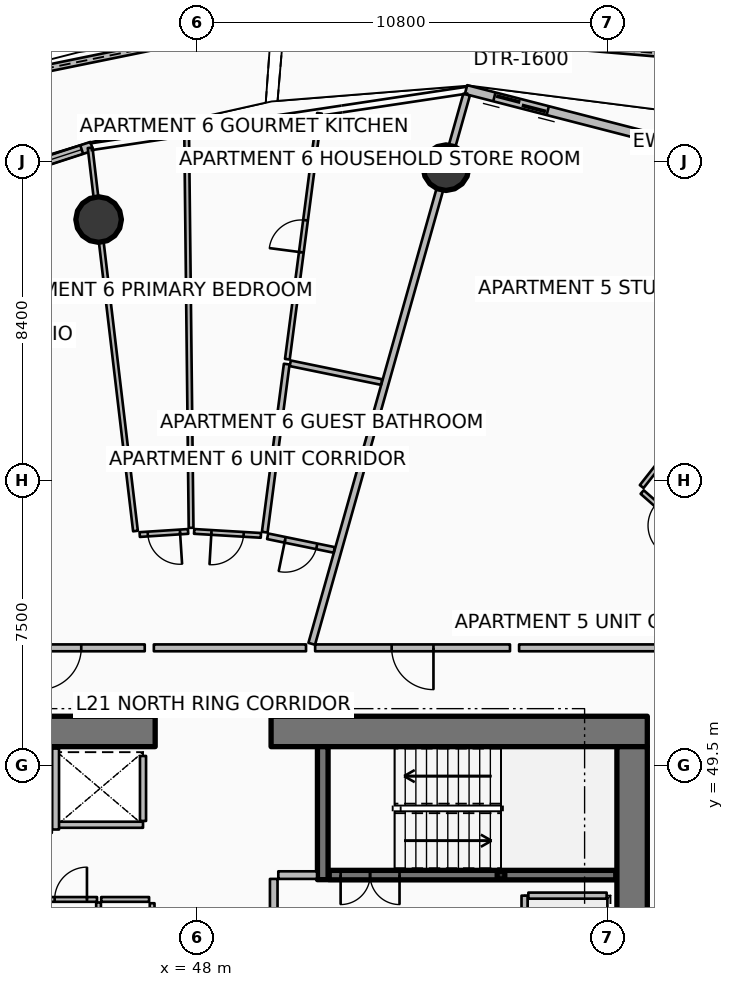
"""IFC4 building model, lengths in metres.
Left out: names, types, materials, properties, quantities, classifications, styles, units other than length and angle.
Written with IfcOpenShell. Run it as: python <this file> out.ifc"""

import sys

from ifc_helpers import new_model, si_unit, direction, frame, frame_2d, origin, origin_2d, place, context, subcontext, project, spatial, polyline, rectangle, hollow_rectangle, circle, outline, extrude, element, fill, save


model = new_model("IFC4")
c1 = context("Model", 3, precision=1e-05, world=origin(), true_north=direction((0.0, 1.0)))
c2 = subcontext(c1, "Body", "Model", "MODEL_VIEW")
j1 = project(units=[si_unit("LENGTHUNIT", "METRE"), si_unit("PLANEANGLEUNIT", "RADIAN")], contexts=[c1])
p1 = place(None, origin())
s1 = spatial("IfcSite", under=j1, at=p1, CompositionType="ELEMENT")
p2 = place(p1, origin())
s2 = spatial("IfcBuilding", under=s1, at=p2, CompositionType="ELEMENT")
p3 = place(p2, frame((0.0, 0.0, 86.4)))
s3 = spatial("IfcBuildingStorey", under=s2, at=p3, CompositionType="ELEMENT", Elevation=86.4)
p4 = place(p3, frame((37.0, 50.4, 0.0), z_axis=(0.0, 0.0, 1.0), x_axis=(1.0, 0.0, 0.0)))
e1 = element("IfcWall", 1, at=p4, inside=s3, PredefinedType="SHEAR", context=c2, shape_type="SweptSolid", body=[
    extrude(rectangle(XDim=9.9, YDim=0.8, at=frame_2d((4.95, 0.0))), origin(), (0.0, 0.0, 1.0), 3.75),
])
p5 = place(p3, frame((49.95, 50.4, 0.0), z_axis=(0.0, 0.0, 1.0), x_axis=(1.0, 0.0, 0.0)))
e2 = element("IfcWall", 2, at=p5, inside=s3, PredefinedType="SHEAR", context=c2, shape_type="SweptSolid", body=[
    extrude(rectangle(XDim=9.9, YDim=0.8, at=frame_2d((4.95, 0.0))), origin(), (0.0, 0.0, 1.0), 3.75),
])
p6 = place(p3, frame((59.45, 34.0, 0.0), z_axis=(0.0, 0.0, 1.0), x_axis=(0.0, 1.0, 0.0)))
e3 = element("IfcWall", 3, at=p6, inside=s3, PredefinedType="SHEAR", context=c2, shape_type="SweptSolid", body=[
    extrude(rectangle(XDim=16.0, YDim=0.8, at=frame_2d((8.0, 0.0))), origin(), (0.0, 0.0, 1.0), 3.75),
])
p7 = place(p3, frame((51.31, 46.5, 0.0), z_axis=(0.0, 0.0, 1.0), x_axis=(0.0, 1.0, 0.0)))
e4 = element("IfcWall", 4, at=p7, inside=s3, PredefinedType="SHEAR", context=c2, shape_type="SweptSolid", body=[
    extrude(rectangle(XDim=3.5, YDim=0.28, at=frame_2d((1.75, 0.0))), origin(), (0.0, 0.0, 1.0), 3.75),
])
p8 = place(p3, frame((56.0, 46.62, 0.0), z_axis=(0.0, 0.0, 1.0), x_axis=(1.0, 0.0, 0.0)))
e5 = element("IfcColumn", 5, at=p8, inside=s3, PredefinedType="COLUMN", context=c2, shape_type="SweptSolid", body=[
    extrude(hollow_rectangle(XDim=0.2, YDim=0.2, WallThickness=0.01, InnerFilletRadius=0.01, OuterFilletRadius=0.02, at=origin_2d()), origin(), (0.0, 0.0, 1.0), 1.67),
])
for number, where, z_axis, x_axis in (
    (6, (54.553, 65.234, 0.0), (0.0, 0.0, 1.0), (1.0, 0.0, 0.0)),
    (7, (45.412, 63.869, 0.0), (0.0, 0.0, 1.0), (1.0, 0.0, 0.0)),
):
    element("IfcColumn", number, at=place(p3, frame(where, z_axis=z_axis, x_axis=x_axis)), inside=s3, PredefinedType="COLUMN", context=c2, shape_type="SweptSolid", body=[
        extrude(circle(Radius=0.6, at=origin_2d()), origin(), (0.0, 0.0, 1.0), 3.5),
    ])
p9 = place(p3, frame((61.201, 68.154, 0.0), z_axis=(0.0, 0.0, 1.0), x_axis=(-0.996375069037, 0.08506892383, 0.0)))
e8 = element("IfcWall", 8, at=p9, inside=s3, PredefinedType="PARAPET", context=c2, shape_type="SweptSolid", body=[
    extrude(outline(polyline([(0.0, 0.0), (10.943, 0.0), (10.943, 1.483), (5.471, 1.284), (0.0, 1.148), (0.0, 0.0)])), frame((0.0, 0.09, 0.0), z_axis=(0.0, -1.0, 0.0), x_axis=(1.0, 0.0, 0.0)), (0.0, 0.0, 1.0), 0.18),
])
p10 = place(p3, frame((49.963, 69.055, 0.0), z_axis=(0.0, 0.0, 1.0), x_axis=(-0.979793885894, -0.200009852668, 0.0)))
e9 = element("IfcWall", 9, at=p10, inside=s3, PredefinedType="PARAPET", context=c2, shape_type="SweptSolid", body=[
    extrude(outline(polyline([(0.0, 0.0), (10.173, 0.0), (10.173, 1.832), (5.086, 1.696), (0.0, 1.497), (0.0, 0.0)])), frame((0.0, 0.09, 0.0), z_axis=(0.0, -1.0, 0.0), x_axis=(1.0, 0.0, 0.0)), (0.0, 0.0, 1.0), 0.18),
])
p11 = place(p3, frame((65.814, 64.523, 0.0), z_axis=(0.0, 0.0, 1.0), x_axis=(-0.968356180858, 0.249572248045, 0.0)))
e10 = element("IfcWall", 10, at=p11, inside=s3, PredefinedType="SOLIDWALL", context=c2, shape_type="SweptSolid", body=[
    extrude(rectangle(XDim=11.084, YDim=0.24, at=frame_2d((5.542, 0.0))), origin(), (0.0, 0.0, 1.0), 2.45),
])
p12 = place(p11, frame((8.865, 0.0, 0.0)))
e11 = element("IfcOpeningElement", 11, at=p12, cuts=e10, PredefinedType="OPENING", context=c2, shape_type="SweptSolid", body=[
    extrude(rectangle(XDim=1.45, YDim=2.15, at=frame_2d((0.725, 1.075))), frame((0.0, 0.13, 0.0), z_axis=(0.0, -1.0, 0.0), x_axis=(1.0, 0.0, 0.0)), (0.0, 0.0, 1.0), 0.26),
])
p13 = place(p11, frame((0.28, 0.0, 0.65)))
e12 = element("IfcOpeningElement", 12, at=p13, cuts=e10, PredefinedType="OPENING", context=c2, shape_type="SweptSolid", body=[
    extrude(rectangle(XDim=1.6, YDim=1.5, at=frame_2d((0.8, 0.75))), frame((0.0, 0.13, 0.0), z_axis=(0.0, -1.0, 0.0), x_axis=(1.0, 0.0, 0.0)), (0.0, 0.0, 1.0), 0.26),
])
p14 = place(p3, frame((45.233, 65.797, 0.0), z_axis=(0.0, 0.0, 1.0), x_axis=(-0.951052494852, -0.30902937083, 0.0)))
e13 = element("IfcWall", 13, at=p14, inside=s3, PredefinedType="SOLIDWALL", context=c2, shape_type="SweptSolid", body=[
    extrude(rectangle(XDim=9.444, YDim=0.24, at=frame_2d((4.722, 0.0))), origin(), (0.0, 0.0, 1.0), 2.45),
])
p15 = place(p14, frame((7.224, 0.0, 0.0)))
e14 = element("IfcOpeningElement", 14, at=p15, cuts=e13, PredefinedType="OPENING", context=c2, shape_type="SweptSolid", body=[
    extrude(rectangle(XDim=1.45, YDim=2.15, at=frame_2d((0.725, 1.075))), frame((0.0, 0.13, 0.0), z_axis=(0.0, -1.0, 0.0), x_axis=(1.0, 0.0, 0.0)), (0.0, 0.0, 1.0), 0.26),
])
p16 = place(p14, frame((0.28, 0.0, 0.65)))
e15 = element("IfcOpeningElement", 15, at=p16, cuts=e13, PredefinedType="OPENING", context=c2, shape_type="SweptSolid", body=[
    extrude(rectangle(XDim=1.6, YDim=1.5, at=frame_2d((0.8, 0.75))), frame((0.0, 0.13, 0.0), z_axis=(0.0, -1.0, 0.0), x_axis=(1.0, 0.0, 0.0)), (0.0, 0.0, 1.0), 0.26),
])
p17 = place(p3, frame((51.48, 46.62, 0.0), z_axis=(0.0, 0.0, 1.0), x_axis=(1.0, 0.0, 0.0)))
e16 = element("IfcWall", 16, at=p17, inside=s3, PredefinedType="SOLIDWALL", context=c2, shape_type="SweptSolid", body=[
    extrude(rectangle(XDim=7.54, YDim=0.25, at=frame_2d((3.77, 0.0))), origin(), (0.0, 0.0, 1.0), 3.5),
])
p18 = place(p17, frame((0.3, 0.0, 0.0)))
e17 = element("IfcOpeningElement", 17, at=p18, cuts=e16, PredefinedType="OPENING", context=c2, shape_type="SweptSolid", body=[
    extrude(rectangle(XDim=1.55, YDim=2.15, at=frame_2d((0.775, 1.075))), frame((0.0, 0.135, 0.0), z_axis=(0.0, -1.0, 0.0), x_axis=(1.0, 0.0, 0.0)), (0.0, 0.0, 1.0), 0.27),
])
p19 = place(p3, frame((46.58, 47.945, 0.0), z_axis=(0.0, 0.0, 1.0), x_axis=(-1.0, 0.0, 0.0)))
e18 = element("IfcWall", 18, at=p19, inside=s3, PredefinedType="PARTITIONING", context=c2, shape_type="SweptSolid", body=[
    extrude(rectangle(XDim=2.26, YDim=0.16, at=frame_2d((1.13, 0.0))), origin(), (0.0, 0.0, 1.0), 3.5),
])
p20 = place(p3, frame((46.58, 48.045, 0.0), z_axis=(0.0, 0.0, 1.0), x_axis=(0.0, 1.0, 0.0)))
e19 = element("IfcWall", 19, at=p20, inside=s3, PredefinedType="PARTITIONING", context=c2, shape_type="SweptSolid", body=[
    extrude(rectangle(XDim=1.71, YDim=0.16, at=frame_2d((0.855, 0.0))), origin(), (0.0, 0.0, 1.0), 3.5),
])
p21 = place(p3, frame((56.62, 46.08, 0.0), z_axis=(0.0, 0.0, 1.0), x_axis=(0.0, -1.0, 0.0)))
e20 = element("IfcWall", 20, at=p21, inside=s3, PredefinedType="PARTITIONING", context=c2, shape_type="SweptSolid", body=[
    extrude(rectangle(XDim=2.46, YDim=0.16, at=frame_2d((1.23, 0.0))), origin(), (0.0, 0.0, 1.0), 3.5),
])
p22 = place(p21, frame((0.68, 0.0, 0.0)))
e21 = element("IfcOpeningElement", 21, at=p22, cuts=e20, PredefinedType="OPENING", context=c2, shape_type="SweptSolid", body=[
    extrude(rectangle(XDim=1.1, YDim=2.1, at=frame_2d((0.55, 1.05))), frame((0.0, 0.09, 0.0), z_axis=(0.0, -1.0, 0.0), x_axis=(1.0, 0.0, 0.0)), (0.0, 0.0, 1.0), 0.18),
])
p23 = place(p3, frame((56.72, 46.08, 0.0), z_axis=(0.0, 0.0, 1.0), x_axis=(1.0, 0.0, 0.0)))
e22 = element("IfcWall", 22, at=p23, inside=s3, PredefinedType="PARTITIONING", context=c2, shape_type="SweptSolid", body=[
    extrude(rectangle(XDim=2.06, YDim=0.16, at=frame_2d((1.03, 0.0))), origin(), (0.0, 0.0, 1.0), 3.5),
])
p24 = place(p3, frame((44.28, 47.82, 0.0), z_axis=(0.0, 0.0, 1.0), x_axis=(0.0, 1.0, 0.0)))
e23 = element("IfcWall", 23, at=p24, inside=s3, PredefinedType="PARTITIONING", context=c2, shape_type="SweptSolid", body=[
    extrude(rectangle(XDim=2.13, YDim=0.18, at=frame_2d((1.065, 0.0))), origin(), (0.0, 0.0, 1.0), 3.5),
])
p25 = place(p3, frame((50.14, 46.62, 0.0), z_axis=(0.0, 0.0, 1.0), x_axis=(1.0, 0.0, 0.0)))
e24 = element("IfcWall", 24, at=p25, inside=s3, PredefinedType="PARTITIONING", context=c2, shape_type="SweptSolid", body=[
    extrude(rectangle(XDim=1.02, YDim=0.2, at=frame_2d((0.51, 0.0))), origin(), (0.0, 0.0, 1.0), 3.5),
])
p26 = place(p3, frame((50.02, 43.22, 0.0), z_axis=(0.0, 0.0, 1.0), x_axis=(0.0, 1.0, 0.0)))
e25 = element("IfcWall", 25, at=p26, inside=s3, PredefinedType="PARTITIONING", context=c2, shape_type="SweptSolid", body=[
    extrude(rectangle(XDim=3.3, YDim=0.2, at=frame_2d((1.65, 0.0))), origin(), (0.0, 0.0, 1.0), 3.5),
])
p27 = place(p26, frame((1.125, 0.0, 0.0)))
e26 = element("IfcOpeningElement", 26, at=p27, cuts=e25, PredefinedType="OPENING", context=c2, shape_type="SweptSolid", body=[
    extrude(rectangle(XDim=1.05, YDim=2.1, at=frame_2d((0.525, 1.05))), frame((0.0, 0.11, 0.0), z_axis=(0.0, -1.0, 0.0), x_axis=(1.0, 0.0, 0.0)), (0.0, 0.0, 1.0), 0.22),
])
p28 = place(p3, frame((45.41, 43.67, 0.0), z_axis=(0.0, 0.0, 1.0), x_axis=(0.0, 1.0, 0.0)))
e27 = element("IfcWall", 27, at=p28, inside=s3, PredefinedType="PARTITIONING", context=c2, shape_type="SweptSolid", body=[
    extrude(rectangle(XDim=2.23, YDim=0.125, at=frame_2d((1.115, 0.0))), origin(), (0.0, 0.0, 1.0), 2.94),
])
p29 = place(p3, frame((46.82, 43.69, 0.0), z_axis=(0.0, 0.0, 1.0), x_axis=(0.0, 1.0, 0.0)))
e28 = element("IfcWall", 28, at=p29, inside=s3, PredefinedType="PARTITIONING", context=c2, shape_type="SweptSolid", body=[
    extrude(rectangle(XDim=2.19, YDim=0.125, at=frame_2d((1.095, 0.0))), origin(), (0.0, 0.0, 1.0), 2.94),
])
p30 = place(p29, frame((0.67, 0.0, 0.0)))
e29 = element("IfcOpeningElement", 29, at=p30, cuts=e28, PredefinedType="OPENING", context=c2, shape_type="SweptSolid", body=[
    extrude(rectangle(XDim=0.85, YDim=2.06, at=frame_2d((0.425, 1.03))), frame((0.0, 0.073, 0.0), z_axis=(0.0, -1.0, 0.0), x_axis=(1.0, 0.0, 0.0)), (0.0, 0.0, 1.0), 0.145),
])
p31 = place(p3, frame((43.99, 45.98, 0.0), z_axis=(0.0, 0.0, 1.0), x_axis=(1.0, 0.0, 0.0)))
e30 = element("IfcWall", 30, at=p31, inside=s3, PredefinedType="PARTITIONING", context=c2, shape_type="SweptSolid", body=[
    extrude(rectangle(XDim=1.38, YDim=0.125, at=frame_2d((0.69, 0.0))), origin(), (0.0, 0.0, 1.0), 2.94),
])
p32 = place(p31, frame((0.265, 0.0, 0.0)))
e31 = element("IfcOpeningElement", 31, at=p32, cuts=e30, PredefinedType="OPENING", context=c2, shape_type="SweptSolid", body=[
    extrude(rectangle(XDim=0.85, YDim=2.06, at=frame_2d((0.425, 1.03))), frame((0.0, 0.073, 0.0), z_axis=(0.0, -1.0, 0.0), x_axis=(1.0, 0.0, 0.0)), (0.0, 0.0, 1.0), 0.145),
])
p33 = place(p3, frame((45.48, 45.98, 0.0), z_axis=(0.0, 0.0, 1.0), x_axis=(1.0, 0.0, 0.0)))
e32 = element("IfcWall", 32, at=p33, inside=s3, PredefinedType="PARTITIONING", context=c2, shape_type="SweptSolid", body=[
    extrude(rectangle(XDim=1.26, YDim=0.125, at=frame_2d((0.63, 0.0))), origin(), (0.0, 0.0, 1.0), 2.94),
])
p34 = place(p3, frame((51.019, 52.706, 0.0), z_axis=(0.0, 0.0, 1.0), x_axis=(0.271450895995, 0.962452290279, 0.0)))
e33 = element("IfcWall", 33, at=p34, inside=s3, PredefinedType="PARTITIONING", context=c2, shape_type="SweptSolid", body=[
    extrude(rectangle(XDim=15.014, YDim=0.18, at=frame_2d((7.507, 0.0))), origin(), (0.0, 0.0, 1.0), 2.94),
])
p35 = place(p3, frame((56.236, 52.6, 0.0), z_axis=(0.0, 0.0, 1.0), x_axis=(-1.0, 0.0, 0.0)))
e34 = element("IfcWall", 34, at=p35, inside=s3, PredefinedType="PARTITIONING", context=c2, shape_type="SweptSolid", body=[
    extrude(rectangle(XDim=5.127, YDim=0.18, at=frame_2d((2.563, 0.0))), origin(), (0.0, 0.0, 1.0), 2.94),
])
p36 = place(p35, frame((2.013, 0.0, 0.0)))
e35 = element("IfcOpeningElement", 35, at=p36, cuts=e34, PredefinedType="OPENING", context=c2, shape_type="SweptSolid", body=[
    extrude(rectangle(XDim=1.1, YDim=2.1, at=frame_2d((0.55, 1.05))), frame((0.0, 0.1, 0.0), z_axis=(0.0, -1.0, 0.0), x_axis=(1.0, 0.0, 0.0)), (0.0, 0.0, 1.0), 0.2),
])
p37 = place(p3, frame((61.53, 52.6, 0.0), z_axis=(0.0, 0.0, 1.0), x_axis=(-1.0, 0.0, 0.0)))
e36 = element("IfcWall", 36, at=p37, inside=s3, PredefinedType="PARTITIONING", context=c2, shape_type="SweptSolid", body=[
    extrude(rectangle(XDim=5.054, YDim=0.18, at=frame_2d((2.527, 0.0))), origin(), (0.0, 0.0, 1.0), 2.94),
])
p38 = place(p3, frame((59.702, 56.844, 0.0), z_axis=(0.0, 0.0, 1.0), x_axis=(0.619083405129, 0.785325243128, 0.0)))
e37 = element("IfcWall", 37, at=p38, inside=s3, PredefinedType="PARTITIONING", context=c2, shape_type="SweptSolid", body=[
    extrude(rectangle(XDim=9.769, YDim=0.125, at=frame_2d((4.885, 0.0))), origin(), (0.0, 0.0, 1.0), 2.94),
])
p39 = place(p3, frame((61.084, 55.497, 0.0), z_axis=(0.0, 0.0, 1.0), x_axis=(-0.75124742024, 0.660020691784, 0.0)))
e38 = element("IfcWall", 38, at=p39, inside=s3, PredefinedType="PARTITIONING", context=c2, shape_type="SweptSolid", body=[
    extrude(rectangle(XDim=1.823, YDim=0.125, at=frame_2d((0.911, 0.0))), origin(), (0.0, 0.0, 1.0), 2.94),
])
p40 = place(p39, frame((0.486, 0.0, 0.0)))
e39 = element("IfcOpeningElement", 39, at=p40, cuts=e38, PredefinedType="OPENING", context=c2, shape_type="SweptSolid", body=[
    extrude(rectangle(XDim=0.85, YDim=2.06, at=frame_2d((0.425, 1.03))), frame((0.0, 0.073, 0.0), z_axis=(0.0, -1.0, 0.0), x_axis=(1.0, 0.0, 0.0)), (0.0, 0.0, 1.0), 0.145),
])
p41 = place(p3, frame((46.625, 52.6, 0.0), z_axis=(0.0, 0.0, 1.0), x_axis=(-1.0, 0.0, 0.0)))
e40 = element("IfcWall", 40, at=p41, inside=s3, PredefinedType="PARTITIONING", context=c2, shape_type="SweptSolid", body=[
    extrude(rectangle(XDim=4.442, YDim=0.18, at=frame_2d((2.221, 0.0))), origin(), (0.0, 0.0, 1.0), 2.94),
])
p42 = place(p41, frame((1.671, 0.0, 0.0)))
e41 = element("IfcOpeningElement", 41, at=p42, cuts=e40, PredefinedType="OPENING", context=c2, shape_type="SweptSolid", body=[
    extrude(rectangle(XDim=1.1, YDim=2.1, at=frame_2d((0.55, 1.05))), frame((0.0, 0.1, 0.0), z_axis=(0.0, -1.0, 0.0), x_axis=(1.0, 0.0, 0.0)), (0.0, 0.0, 1.0), 0.2),
])
p43 = place(p3, frame((50.869, 52.6, 0.0), z_axis=(0.0, 0.0, 1.0), x_axis=(-1.0, 0.0, 0.0)))
e42 = element("IfcWall", 42, at=p43, inside=s3, PredefinedType="PARTITIONING", context=c2, shape_type="SweptSolid", body=[
    extrude(rectangle(XDim=4.004, YDim=0.18, at=frame_2d((2.002, 0.0))), origin(), (0.0, 0.0, 1.0), 2.94),
])
p44 = place(p3, frame((46.382, 55.674, 0.0), z_axis=(0.0, 0.0, 1.0), x_axis=(-0.117533197276, 0.99306895407, 0.0)))
e43 = element("IfcWall", 43, at=p44, inside=s3, PredefinedType="PARTITIONING", context=c2, shape_type="SweptSolid", body=[
    extrude(rectangle(XDim=10.153, YDim=0.125, at=frame_2d((5.077, 0.0))), origin(), (0.0, 0.0, 1.0), 2.94),
])
p45 = place(p3, frame((51.612, 55.176, 0.0), z_axis=(0.0, 0.0, 1.0), x_axis=(-0.979559973395, 0.201152326663, 0.0)))
e44 = element("IfcWall", 44, at=p45, inside=s3, PredefinedType="PARTITIONING", context=c2, shape_type="SweptSolid", body=[
    extrude(rectangle(XDim=1.789, YDim=0.15, at=frame_2d((0.895, 0.0))), origin(), (0.0, 0.0, 1.0), 2.94),
])
p46 = place(p45, frame((0.469, 0.0, 0.0)))
e45 = element("IfcOpeningElement", 45, at=p46, cuts=e44, PredefinedType="OPENING", context=c2, shape_type="SweptSolid", body=[
    extrude(rectangle(XDim=0.85, YDim=2.06, at=frame_2d((0.425, 1.03))), frame((0.0, 0.085, 0.0), z_axis=(0.0, -1.0, 0.0), x_axis=(1.0, 0.0, 0.0)), (0.0, 0.0, 1.0), 0.17),
])
p47 = place(p3, frame((52.858, 59.594, 0.0), z_axis=(0.0, 0.0, 1.0), x_axis=(-0.979569035828, 0.201108189903, 0.0)))
e46 = element("IfcWall", 46, at=p47, inside=s3, PredefinedType="PARTITIONING", context=c2, shape_type="SweptSolid", body=[
    extrude(rectangle(XDim=2.453, YDim=0.15, at=frame_2d((1.227, 0.0))), origin(), (0.0, 0.0, 1.0), 2.94),
])
p48 = place(p3, frame((49.783, 55.643, 0.0), z_axis=(0.0, 0.0, 1.0), x_axis=(0.129624682181, 0.991563130501, 0.0)))
e47 = element("IfcWall", 47, at=p48, inside=s3, PredefinedType="PARTITIONING", context=c2, shape_type="SweptSolid", body=[
    extrude(rectangle(XDim=4.46, YDim=0.15, at=frame_2d((2.23, 0.0))), origin(), (0.0, 0.0, 1.0), 2.94),
])
p49 = place(p3, frame((50.378, 60.194, 0.0), z_axis=(0.0, 0.0, 1.0), x_axis=(0.129622249643, 0.991563448498, 0.0)))
e48 = element("IfcWall", 48, at=p49, inside=s3, PredefinedType="PARTITIONING", context=c2, shape_type="SweptSolid", body=[
    extrude(rectangle(XDim=6.526, YDim=0.125, at=frame_2d((3.263, 0.0))), origin(), (0.0, 0.0, 1.0), 2.94),
])
p50 = place(p49, frame((2.838, 0.0, 0.0)))
e49 = element("IfcOpeningElement", 49, at=p50, cuts=e48, PredefinedType="OPENING", context=c2, shape_type="SweptSolid", body=[
    extrude(rectangle(XDim=0.85, YDim=2.06, at=frame_2d((0.425, 1.03))), frame((0.0, 0.073, 0.0), z_axis=(0.0, -1.0, 0.0), x_axis=(1.0, 0.0, 0.0)), (0.0, 0.0, 1.0), 0.145),
])
p51 = place(p3, frame((47.845, 55.758, 0.0), z_axis=(0.0, 0.0, 1.0), x_axis=(-0.011264572172, 0.999936552694, 0.0)))
e50 = element("IfcWall", 50, at=p51, inside=s3, PredefinedType="PARTITIONING", context=c2, shape_type="SweptSolid", body=[
    extrude(rectangle(XDim=10.382, YDim=0.125, at=frame_2d((5.191, 0.0))), origin(), (0.0, 0.0, 1.0), 2.94),
])
p52 = place(p3, frame((49.682, 55.559, 0.0), z_axis=(0.0, 0.0, 1.0), x_axis=(-0.99824215698, 0.059267158097, 0.0)))
e51 = element("IfcWall", 51, at=p52, inside=s3, PredefinedType="PARTITIONING", context=c2, shape_type="SweptSolid", body=[
    extrude(rectangle(XDim=1.759, YDim=0.125, at=frame_2d((0.879, 0.0))), origin(), (0.0, 0.0, 1.0), 2.94),
])
p53 = place(p52, frame((0.455, 0.0, 0.0)))
e52 = element("IfcOpeningElement", 52, at=p53, cuts=e51, PredefinedType="OPENING", context=c2, shape_type="SweptSolid", body=[
    extrude(rectangle(XDim=0.85, YDim=2.06, at=frame_2d((0.425, 1.03))), frame((0.0, 0.073, 0.0), z_axis=(0.0, -1.0, 0.0), x_axis=(1.0, 0.0, 0.0)), (0.0, 0.0, 1.0), 0.145),
])
p54 = place(p3, frame((47.766, 55.663, 0.0), z_axis=(0.0, 0.0, 1.0), x_axis=(-0.997930857608, -0.064296216329, 0.0)))
e53 = element("IfcWall", 53, at=p54, inside=s3, PredefinedType="PARTITIONING", context=c2, shape_type="SweptSolid", body=[
    extrude(rectangle(XDim=1.276, YDim=0.125, at=frame_2d((0.638, 0.0))), origin(), (0.0, 0.0, 1.0), 2.94),
])
p55 = place(p54, frame((0.213, 0.0, 0.0)))
e54 = element("IfcOpeningElement", 54, at=p55, cuts=e53, PredefinedType="OPENING", context=c2, shape_type="SweptSolid", body=[
    extrude(rectangle(XDim=0.85, YDim=2.06, at=frame_2d((0.425, 1.03))), frame((0.0, 0.073, 0.0), z_axis=(0.0, -1.0, 0.0), x_axis=(1.0, 0.0, 0.0)), (0.0, 0.0, 1.0), 0.145),
])
p56 = place(p12, origin())
e55 = element("IfcDoor", 55, at=p56, inside=s3, OperationType="DOUBLE_DOOR_SLIDING", PredefinedType="DOOR", context=c2, shape_type="SweptSolid", body=[
    extrude(rectangle(XDim=1.45, YDim=2.15, at=frame_2d((0.725, 1.075))), frame((0.0, 0.025, 0.0), z_axis=(0.0, -1.0, 0.0), x_axis=(1.0, 0.0, 0.0)), (0.0, 0.0, 1.0), 0.05),
])
fill(e11, e55)
p57 = place(p16, origin())
e56 = element("IfcWindow", 56, at=p57, inside=s3, PartitioningType="SINGLE_PANEL", PredefinedType="WINDOW", context=c2, shape_type="SweptSolid", body=[
    extrude(rectangle(XDim=1.6, YDim=1.5, at=frame_2d((0.8, 0.75))), frame((0.0, 0.03, 0.0), z_axis=(0.0, -1.0, 0.0), x_axis=(1.0, 0.0, 0.0)), (0.0, 0.0, 1.0), 0.06),
])
fill(e15, e56)
p58 = place(p18, origin())
e57 = element("IfcDoor", 57, at=p58, inside=s3, OperationType="DOUBLE_DOOR_SINGLE_SWING", PredefinedType="DOOR", context=c2, shape_type="SweptSolid", body=[
    extrude(rectangle(XDim=1.55, YDim=2.15, at=frame_2d((0.775, 1.075))), frame((0.0, 0.025, 0.0), z_axis=(0.0, -1.0, 0.0), x_axis=(1.0, 0.0, 0.0)), (0.0, 0.0, 1.0), 0.05),
])
fill(e17, e57)
p59 = place(p32, origin())
e58 = element("IfcDoor", 58, at=p59, inside=s3, OperationType="SINGLE_SWING_RIGHT", PredefinedType="DOOR", context=c2, shape_type="SweptSolid", body=[
    extrude(rectangle(XDim=0.85, YDim=2.06, at=frame_2d((0.425, 1.03))), frame((0.0, 0.025, 0.0), z_axis=(0.0, -1.0, 0.0), x_axis=(1.0, 0.0, 0.0)), (0.0, 0.0, 1.0), 0.05),
])
fill(e31, e58)
p60 = place(p36, origin())
e59 = element("IfcDoor", 59, at=p60, inside=s3, OperationType="SINGLE_SWING_LEFT", PredefinedType="DOOR", context=c2, shape_type="SweptSolid", body=[
    extrude(rectangle(XDim=1.1, YDim=2.1, at=frame_2d((0.55, 1.05))), frame((0.0, 0.025, 0.0), z_axis=(0.0, -1.0, 0.0), x_axis=(1.0, 0.0, 0.0)), (0.0, 0.0, 1.0), 0.05),
])
fill(e35, e59)
p61 = place(p42, origin())
e60 = element("IfcDoor", 60, at=p61, inside=s3, OperationType="SINGLE_SWING_RIGHT", PredefinedType="DOOR", context=c2, shape_type="SweptSolid", body=[
    extrude(rectangle(XDim=1.1, YDim=2.1, at=frame_2d((0.55, 1.05))), frame((0.0, 0.025, 0.0), z_axis=(0.0, -1.0, 0.0), x_axis=(1.0, 0.0, 0.0)), (0.0, 0.0, 1.0), 0.05),
])
fill(e41, e60)
p62 = place(p46, origin())
e61 = element("IfcDoor", 61, at=p62, inside=s3, OperationType="SINGLE_SWING_RIGHT", PredefinedType="DOOR", context=c2, shape_type="SweptSolid", body=[
    extrude(rectangle(XDim=0.85, YDim=2.06, at=frame_2d((0.425, 1.03))), frame((0.0, 0.025, 0.0), z_axis=(0.0, -1.0, 0.0), x_axis=(1.0, 0.0, 0.0)), (0.0, 0.0, 1.0), 0.05),
])
fill(e45, e61)
p63 = place(p50, origin())
e62 = element("IfcDoor", 62, at=p63, inside=s3, OperationType="SINGLE_SWING_LEFT", PredefinedType="DOOR", context=c2, shape_type="SweptSolid", body=[
    extrude(rectangle(XDim=0.85, YDim=2.06, at=frame_2d((0.425, 1.03))), frame((0.0, 0.025, 0.0), z_axis=(0.0, -1.0, 0.0), x_axis=(1.0, 0.0, 0.0)), (0.0, 0.0, 1.0), 0.05),
])
fill(e49, e62)
p64 = place(p53, origin())
e63 = element("IfcDoor", 63, at=p64, inside=s3, OperationType="SINGLE_SWING_RIGHT", PredefinedType="DOOR", context=c2, shape_type="SweptSolid", body=[
    extrude(rectangle(XDim=0.85, YDim=2.06, at=frame_2d((0.425, 1.03))), frame((0.0, 0.025, 0.0), z_axis=(0.0, -1.0, 0.0), x_axis=(1.0, 0.0, 0.0)), (0.0, 0.0, 1.0), 0.05),
])
fill(e52, e63)
p65 = place(p55, origin())
e64 = element("IfcDoor", 64, at=p65, inside=s3, OperationType="SINGLE_SWING_LEFT", PredefinedType="DOOR", context=c2, shape_type="SweptSolid", body=[
    extrude(rectangle(XDim=0.85, YDim=2.06, at=frame_2d((0.425, 1.03))), frame((0.0, 0.025, 0.0), z_axis=(0.0, -1.0, 0.0), x_axis=(1.0, 0.0, 0.0)), (0.0, 0.0, 1.0), 0.05),
])
fill(e54, e64)
save(model, sys.argv[1])
